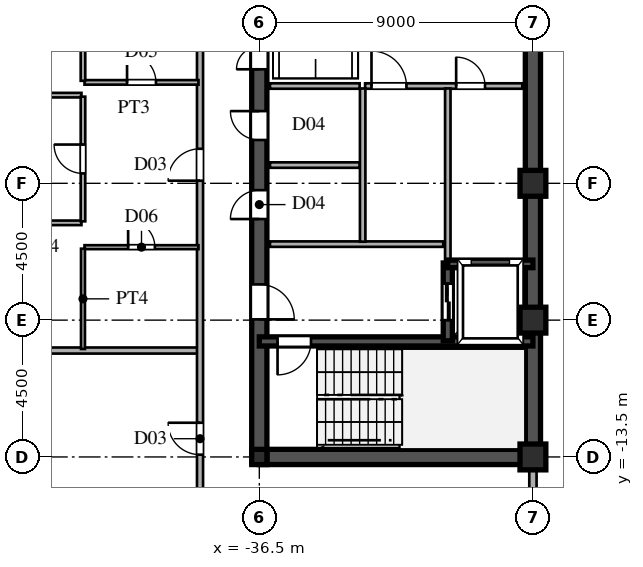
"""IFC4 building model, lengths in metres.
Left out: names, types, materials, properties, quantities, classifications, styles, units other than length and angle.
Written with IfcOpenShell. Run it as: python <this file> out.ifc"""

import sys

from ifc_helpers import new_model, si_unit, direction, frame, frame_2d, origin, origin_2d, place, context, subcontext, project, spatial, rectangle, hollow_rectangle, i_section, extrude, source, transform, mapped, element, fill, save


model = new_model("IFC4")
c1 = context("Model", 3, precision=1e-05, world=origin(), true_north=direction((0.0, 1.0)))
c2 = subcontext(c1, "Body", "Model", "MODEL_VIEW")
j1 = project(units=[si_unit("LENGTHUNIT", "METRE"), si_unit("PLANEANGLEUNIT", "RADIAN")], contexts=[c1])
p1 = place(None, origin())
s1 = spatial("IfcSite", under=j1, at=p1, CompositionType="ELEMENT")
p2 = place(p1, origin())
s2 = spatial("IfcBuilding", under=s1, at=p2, CompositionType="ELEMENT")
p3 = place(p2, frame((0.0, 0.0, 210.3)))
s3 = spatial("IfcBuildingStorey", under=s2, at=p3, CompositionType="ELEMENT", Elevation=210.3)
m1 = source(origin(), c2, "Body", "SweptSolid", [
    extrude(hollow_rectangle(XDim=0.85, YDim=0.85, WallThickness=0.036, at=origin_2d()), origin(), (0.0, 0.0, 1.0), 3.6),
])
for number, where, z_axis, x_axis in (
    (1, (-27.5, -13.5, 0.0), (0.0, 0.0, 1.0), (1.0, 0.0, 0.0)),
    (2, (-27.5, -9.0, 0.0), (0.0, 0.0, 1.0), (1.0, 0.0, 0.0)),
    (3, (-27.5, -4.5, 0.0), (0.0, 0.0, 1.0), (1.0, 0.0, 0.0)),
):
    element("IfcColumn", number, at=place(p3, frame(where, z_axis=z_axis, x_axis=x_axis)), inside=s3, PredefinedType="COLUMN", context=c2, shape_type="MappedRepresentation", body=[
        mapped(m1, transform((0.0, 0.0, 0.0), scale=1.0)),
    ])
m2 = source(origin(), c2, "Body", "SweptSolid", [
    extrude(i_section(OverallWidth=0.5, OverallDepth=0.5, WebThickness=0.02, FlangeThickness=0.032, at=origin_2d()), origin(), (0.0, 0.0, 1.0), 3.6),
])
p4 = place(p3, frame((-36.5, -13.5, 0.0), z_axis=(0.0, 0.0, 1.0), x_axis=(1.0, 0.0, 0.0)))
e4 = element("IfcColumn", 4, at=p4, inside=s3, PredefinedType="COLUMN", context=c2, shape_type="MappedRepresentation", body=[
    mapped(m2, transform((0.0, 0.0, 0.0), scale=1.0)),
])
p5 = place(p3, frame((-27.5, -15.98, 0.0), z_axis=(0.0, 0.0, 1.0), x_axis=(0.0, 1.0, 0.0)))
e5 = element("IfcWall", 5, at=p5, inside=s3, PredefinedType="SOLIDWALL", context=c2, shape_type="SweptSolid", body=[
    extrude(rectangle(XDim=1.605, YDim=0.24, at=frame_2d((0.803, 0.0))), origin(), (0.0, 0.0, 1.0), 3.38),
])
p6 = place(p3, frame((-27.5, -14.375, 0.0), z_axis=(0.0, 0.0, 1.0), x_axis=(0.0, 1.0, 0.0)))
e6 = element("IfcWall", 6, at=p6, inside=s3, PredefinedType="SOLIDWALL", context=c2, shape_type="SweptSolid", body=[
    extrude(rectangle(XDim=0.62, YDim=0.24, at=frame_2d((0.31, 0.0))), origin(), (0.0, 0.0, 1.0), 2.88),
])
p7 = place(p3, frame((-27.5, -13.5, 0.0), z_axis=(0.0, 0.0, 1.0), x_axis=(0.0, 1.0, 0.0)))
e7 = element("IfcWall", 7, at=p7, inside=s3, PredefinedType="SHEAR", context=c2, shape_type="SweptSolid", body=[
    extrude(rectangle(XDim=12.2, YDim=0.5, at=frame_2d((6.1, 0.0))), origin(), (0.0, 0.0, 1.0), 3.38),
])
p8 = place(p3, frame((-27.5, -1.3, 0.0), z_axis=(0.0, 0.0, 1.0), x_axis=(0.0, 1.0, 0.0)))
e8 = element("IfcWall", 8, at=p8, inside=s3, PredefinedType="SHEAR", context=c2, shape_type="SweptSolid", body=[
    extrude(rectangle(XDim=2.6, YDim=0.5, at=frame_2d((1.3, 0.0))), origin(), (0.0, 0.0, 1.0), 3.38),
])
p9 = place(p3, frame((-36.5, -13.5, 0.0), z_axis=(0.0, 0.0, 1.0), x_axis=(1.0, 0.0, 0.0)))
e9 = element("IfcWall", 9, at=p9, inside=s3, PredefinedType="SHEAR", context=c2, shape_type="SweptSolid", body=[
    extrude(rectangle(XDim=9.0, YDim=0.5, at=frame_2d((4.5, 0.0))), origin(), (0.0, 0.0, 1.0), 3.38),
])
p10 = place(p3, frame((-36.5, -13.65, 0.0), z_axis=(0.0, 0.0, 1.0), x_axis=(0.0, 1.0, 0.0)))
e10 = element("IfcWall", 10, at=p10, inside=s3, PredefinedType="SHEAR", context=c2, shape_type="SweptSolid", body=[
    extrude(rectangle(XDim=7.15, YDim=0.5, at=frame_2d((3.575, 0.0))), origin(), (0.0, 0.0, 1.0), 3.38),
])
p11 = place(p10, frame((4.675, 0.0, 0.0)))
e11 = element("IfcOpeningElement", 11, at=p11, cuts=e10, PredefinedType="OPENING", context=c2, shape_type="SweptSolid", body=[
    extrude(rectangle(XDim=1.15, YDim=2.2, at=frame_2d((0.575, 1.1))), frame((0.0, 0.26, 0.0), z_axis=(0.0, -1.0, 0.0), x_axis=(1.0, 0.0, 0.0)), (0.0, 0.0, 1.0), 0.52),
])
p12 = place(p3, frame((-36.5, -1.3, 0.0), z_axis=(0.0, 0.0, 1.0), x_axis=(0.0, 1.0, 0.0)))
e12 = element("IfcWall", 12, at=p12, inside=s3, PredefinedType="SHEAR", context=c2, shape_type="SweptSolid", body=[
    extrude(rectangle(XDim=2.6, YDim=0.5, at=frame_2d((1.3, 0.0))), origin(), (0.0, 0.0, 1.0), 3.38),
])
p13 = place(p12, frame((0.55, 0.0, 0.0)))
e13 = element("IfcOpeningElement", 13, at=p13, cuts=e12, PredefinedType="OPENING", context=c2, shape_type="SweptSolid", body=[
    extrude(rectangle(XDim=1.5, YDim=2.3, at=frame_2d((0.75, 1.15))), frame((0.0, 0.26, 0.0), z_axis=(0.0, -1.0, 0.0), x_axis=(1.0, 0.0, 0.0)), (0.0, 0.0, 1.0), 0.52),
])
p14 = place(p3, frame((-36.5, -6.5, 0.0), z_axis=(0.0, 0.0, 1.0), x_axis=(0.0, 1.0, 0.0)))
e14 = element("IfcWall", 14, at=p14, inside=s3, PredefinedType="SHEAR", context=c2, shape_type="SweptSolid", body=[
    extrude(rectangle(XDim=2.6, YDim=0.5, at=frame_2d((1.3, 0.0))), origin(), (0.0, 0.0, 1.0), 3.38),
])
p15 = place(p14, frame((0.825, 0.0, 0.0)))
e15 = element("IfcOpeningElement", 15, at=p15, cuts=e14, PredefinedType="OPENING", context=c2, shape_type="SweptSolid", body=[
    extrude(rectangle(XDim=0.95, YDim=2.15, at=frame_2d((0.475, 1.075))), frame((0.0, 0.26, 0.0), z_axis=(0.0, -1.0, 0.0), x_axis=(1.0, 0.0, 0.0)), (0.0, 0.0, 1.0), 0.52),
])
p16 = place(p3, frame((-36.5, -3.9, 0.0), z_axis=(0.0, 0.0, 1.0), x_axis=(0.0, 1.0, 0.0)))
e16 = element("IfcWall", 16, at=p16, inside=s3, PredefinedType="SHEAR", context=c2, shape_type="SweptSolid", body=[
    extrude(rectangle(XDim=2.6, YDim=0.5, at=frame_2d((1.3, 0.0))), origin(), (0.0, 0.0, 1.0), 3.38),
])
p17 = place(p16, frame((0.825, 0.0, 0.0)))
e17 = element("IfcOpeningElement", 17, at=p17, cuts=e16, PredefinedType="OPENING", context=c2, shape_type="SweptSolid", body=[
    extrude(rectangle(XDim=0.95, YDim=2.15, at=frame_2d((0.475, 1.075))), frame((0.0, 0.26, 0.0), z_axis=(0.0, -1.0, 0.0), x_axis=(1.0, 0.0, 0.0)), (0.0, 0.0, 1.0), 0.52),
])
p18 = place(p3, frame((-36.5, -9.7, 0.0), z_axis=(0.0, 0.0, 1.0), x_axis=(1.0, 0.0, 0.0)))
e18 = element("IfcWall", 18, at=p18, inside=s3, PredefinedType="SHEAR", context=c2, shape_type="SweptSolid", body=[
    extrude(rectangle(XDim=9.0, YDim=0.3, at=frame_2d((4.5, 0.0))), origin(), (0.0, 0.0, 1.0), 3.38),
])
p19 = place(p18, frame((0.6, 0.0, 0.0)))
e19 = element("IfcOpeningElement", 19, at=p19, cuts=e18, PredefinedType="OPENING", context=c2, shape_type="SweptSolid", body=[
    extrude(rectangle(XDim=1.1, YDim=2.2, at=frame_2d((0.55, 1.1))), frame((0.0, 0.16, 0.0), z_axis=(0.0, -1.0, 0.0), x_axis=(1.0, 0.0, 0.0)), (0.0, 0.0, 1.0), 0.32),
])
p20 = place(p3, frame((-30.3, -7.15, 0.0), z_axis=(0.0, 0.0, 1.0), x_axis=(1.0, 0.0, 0.0)))
e20 = element("IfcWall", 20, at=p20, inside=s3, PredefinedType="SHEAR", context=c2, shape_type="SweptSolid", body=[
    extrude(rectangle(XDim=2.8, YDim=0.25, at=frame_2d((1.4, 0.0))), origin(), (0.0, 0.0, 1.0), 3.38),
])
p21 = place(p3, frame((-30.3, -9.68, 0.0), z_axis=(0.0, 0.0, 1.0), x_axis=(0.0, 1.0, 0.0)))
e21 = element("IfcWall", 21, at=p21, inside=s3, PredefinedType="SHEAR", context=c2, shape_type="SweptSolid", body=[
    extrude(rectangle(XDim=2.56, YDim=0.3, at=frame_2d((1.28, 0.0))), origin(), (0.0, 0.0, 1.0), 3.38),
])
p22 = place(p21, frame((0.68, 0.0, 0.0)))
e22 = element("IfcOpeningElement", 22, at=p22, cuts=e21, PredefinedType="OPENING", context=c2, shape_type="SweptSolid", body=[
    extrude(rectangle(XDim=1.2, YDim=2.25, at=frame_2d((0.6, 1.125))), frame((0.0, 0.16, 0.0), z_axis=(0.0, -1.0, 0.0), x_axis=(1.0, 0.0, 0.0)), (0.0, 0.0, 1.0), 0.32),
])
p23 = place(p3, frame((-36.15, -6.5, 0.0), z_axis=(0.0, 0.0, 1.0), x_axis=(1.0, 0.0, 0.0)))
e23 = element("IfcWall", 23, at=p23, inside=s3, PredefinedType="PARTITIONING", context=c2, shape_type="SweptSolid", body=[
    extrude(rectangle(XDim=5.7, YDim=0.18, at=frame_2d((2.85, 0.0))), origin(), (0.0, 0.0, 1.0), 3.38),
])
p24 = place(p3, frame((-33.1, -6.42, 0.0), z_axis=(0.0, 0.0, 1.0), x_axis=(0.0, 1.0, 0.0)))
e24 = element("IfcWall", 24, at=p24, inside=s3, PredefinedType="PARTITIONING", context=c2, shape_type="SweptSolid", body=[
    extrude(rectangle(XDim=5.04, YDim=0.18, at=frame_2d((2.52, 0.0))), origin(), (0.0, 0.0, 1.0), 3.38),
])
p25 = place(p3, frame((-30.3, -1.3, 0.0), z_axis=(0.0, 0.0, 1.0), x_axis=(1.0, 0.0, 0.0)))
e25 = element("IfcWall", 25, at=p25, inside=s3, PredefinedType="PARTITIONING", context=c2, shape_type="SweptSolid", body=[
    extrude(rectangle(XDim=2.45, YDim=0.18, at=frame_2d((1.225, 0.0))), origin(), (0.0, 0.0, 1.0), 3.38),
])
p26 = place(p25, frame((0.275, 0.0, 0.0)))
e26 = element("IfcOpeningElement", 26, at=p26, cuts=e25, PredefinedType="OPENING", context=c2, shape_type="SweptSolid", body=[
    extrude(rectangle(XDim=0.95, YDim=2.15, at=frame_2d((0.475, 1.075))), frame((0.0, 0.1, 0.0), z_axis=(0.0, -1.0, 0.0), x_axis=(1.0, 0.0, 0.0)), (0.0, 0.0, 1.0), 0.2),
])
p27 = place(p3, frame((-33.02, -1.3, 0.0), z_axis=(0.0, 0.0, 1.0), x_axis=(1.0, 0.0, 0.0)))
e27 = element("IfcWall", 27, at=p27, inside=s3, PredefinedType="PARTITIONING", context=c2, shape_type="SweptSolid", body=[
    extrude(rectangle(XDim=2.72, YDim=0.18, at=frame_2d((1.36, 0.0))), origin(), (0.0, 0.0, 1.0), 3.38),
])
p28 = place(p27, frame((0.21, 0.0, 0.0)))
e28 = element("IfcOpeningElement", 28, at=p28, cuts=e27, PredefinedType="OPENING", context=c2, shape_type="SweptSolid", body=[
    extrude(rectangle(XDim=1.15, YDim=2.2, at=frame_2d((0.575, 1.1))), frame((0.0, 0.1, 0.0), z_axis=(0.0, -1.0, 0.0), x_axis=(1.0, 0.0, 0.0)), (0.0, 0.0, 1.0), 0.2),
])
p29 = place(p3, frame((-30.3, -7.12, 0.0), z_axis=(0.0, 0.0, 1.0), x_axis=(0.0, 1.0, 0.0)))
e29 = element("IfcWall", 29, at=p29, inside=s3, PredefinedType="PARTITIONING", context=c2, shape_type="SweptSolid", body=[
    extrude(rectangle(XDim=5.74, YDim=0.18, at=frame_2d((2.87, 0.0))), origin(), (0.0, 0.0, 1.0), 3.38),
])
for number, where, z_axis, x_axis in (
    (30, (-36.15, -1.3, 0.0), (0.0, 0.0, 1.0), (1.0, 0.0, 0.0)),
    (31, (-36.15, -3.9, 0.0), (0.0, 0.0, 1.0), (1.0, 0.0, 0.0)),
):
    element("IfcWall", number, at=place(p3, frame(where, z_axis=z_axis, x_axis=x_axis)), inside=s3, PredefinedType="PARTITIONING", context=c2, shape_type="SweptSolid", body=[
        extrude(rectangle(XDim=2.95, YDim=0.18, at=frame_2d((1.475, 0.0))), origin(), (0.0, 0.0, 1.0), 3.38),
    ])
p30 = place(p3, frame((-53.343, -10.0, 0.0), z_axis=(0.0, 0.0, 1.0), x_axis=(1.0, 0.0, 0.0)))
e32 = element("IfcWall", 32, at=p30, inside=s3, PredefinedType="PARTITIONING", context=c2, shape_type="SweptSolid", body=[
    extrude(rectangle(XDim=14.813, YDim=0.2, at=frame_2d((7.406, 0.0))), origin(), (0.0, 0.0, 1.0), 3.38),
])
p31 = place(p3, frame((-42.25, -6.6, 0.0), z_axis=(0.0, 0.0, 1.0), x_axis=(1.0, 0.0, 0.0)))
e33 = element("IfcWall", 33, at=p31, inside=s3, PredefinedType="PARTITIONING", context=c2, shape_type="SweptSolid", body=[
    extrude(rectangle(XDim=3.75, YDim=0.13, at=frame_2d((1.875, 0.0))), origin(), (0.0, 0.0, 1.0), 3.38),
])
p32 = place(p31, frame((1.435, 0.0, 0.0)))
e34 = element("IfcOpeningElement", 34, at=p32, cuts=e33, PredefinedType="OPENING", context=c2, shape_type="SweptSolid", body=[
    extrude(rectangle(XDim=0.88, YDim=2.1, at=frame_2d((0.44, 1.05))), frame((0.0, 0.075, 0.0), z_axis=(0.0, -1.0, 0.0), x_axis=(1.0, 0.0, 0.0)), (0.0, 0.0, 1.0), 0.15),
])
p33 = place(p3, frame((-60.368, -5.8, 0.0), z_axis=(0.0, 0.0, 1.0), x_axis=(1.0, 0.0, 0.0)))
e35 = element("IfcWall", 35, at=p33, inside=s3, PredefinedType="PARTITIONING", context=c2, shape_type="SweptSolid", body=[
    extrude(rectangle(XDim=18.018, YDim=0.15, at=frame_2d((9.009, 0.0))), origin(), (0.0, 0.0, 1.0), 3.38),
])
p34 = place(p33, frame((11.493, 0.0, 0.0)))
e36 = element("IfcOpeningElement", 36, at=p34, cuts=e35, PredefinedType="OPENING", context=c2, shape_type="SweptSolid", body=[
    extrude(rectangle(XDim=0.95, YDim=2.15, at=frame_2d((0.475, 1.075))), frame((0.0, 0.085, 0.0), z_axis=(0.0, -1.0, 0.0), x_axis=(1.0, 0.0, 0.0)), (0.0, 0.0, 1.0), 0.17),
])
p35 = place(p33, frame((2.476, 0.0, 0.0)))
e37 = element("IfcOpeningElement", 37, at=p35, cuts=e35, PredefinedType="OPENING", context=c2, shape_type="SweptSolid", body=[
    extrude(rectangle(XDim=0.95, YDim=2.15, at=frame_2d((0.475, 1.075))), frame((0.0, 0.085, 0.0), z_axis=(0.0, -1.0, 0.0), x_axis=(1.0, 0.0, 0.0)), (0.0, 0.0, 1.0), 0.17),
])
p36 = place(p3, frame((-67.09, -1.6, 0.0), z_axis=(0.0, 0.0, 1.0), x_axis=(1.0, 0.0, 0.0)))
e38 = element("IfcWall", 38, at=p36, inside=s3, PredefinedType="PARTITIONING", context=c2, shape_type="SweptSolid", body=[
    extrude(rectangle(XDim=24.74, YDim=0.15, at=frame_2d((12.37, 0.0))), origin(), (0.0, 0.0, 1.0), 3.38),
])
p37 = place(p36, frame((18.215, 0.0, 0.0)))
e39 = element("IfcOpeningElement", 39, at=p37, cuts=e38, PredefinedType="OPENING", context=c2, shape_type="SweptSolid", body=[
    extrude(rectangle(XDim=0.95, YDim=2.15, at=frame_2d((0.475, 1.075))), frame((0.0, 0.085, 0.0), z_axis=(0.0, -1.0, 0.0), x_axis=(1.0, 0.0, 0.0)), (0.0, 0.0, 1.0), 0.17),
])
p38 = place(p36, frame((5.698, 0.0, 0.0)))
e40 = element("IfcOpeningElement", 40, at=p38, cuts=e38, PredefinedType="OPENING", context=c2, shape_type="SweptSolid", body=[
    extrude(rectangle(XDim=0.95, YDim=2.15, at=frame_2d((0.475, 1.075))), frame((0.0, 0.085, 0.0), z_axis=(0.0, -1.0, 0.0), x_axis=(1.0, 0.0, 0.0)), (0.0, 0.0, 1.0), 0.17),
])
p39 = place(p3, frame((-42.25, -1.18, 0.0), z_axis=(0.0, 0.0, 1.0), x_axis=(1.0, 0.0, 0.0)))
e41 = element("IfcWall", 41, at=p39, inside=s3, PredefinedType="PARTITIONING", context=c2, shape_type="SweptSolid", body=[
    extrude(rectangle(XDim=3.75, YDim=0.15, at=frame_2d((1.875, 0.0))), origin(), (0.0, 0.0, 1.0), 3.38),
])
p40 = place(p39, frame((1.4, 0.0, 0.0)))
e42 = element("IfcOpeningElement", 42, at=p40, cuts=e41, PredefinedType="OPENING", context=c2, shape_type="SweptSolid", body=[
    extrude(rectangle(XDim=0.95, YDim=2.15, at=frame_2d((0.475, 1.075))), frame((0.0, 0.085, 0.0), z_axis=(0.0, -1.0, 0.0), x_axis=(1.0, 0.0, 0.0)), (0.0, 0.0, 1.0), 0.17),
])
p41 = place(p3, frame((-42.3, -9.95, 0.0), z_axis=(0.0, 0.0, 1.0), x_axis=(0.0, 1.0, 0.0)))
e43 = element("IfcWall", 43, at=p41, inside=s3, PredefinedType="PARTITIONING", context=c2, shape_type="SweptSolid", body=[
    extrude(rectangle(XDim=3.3, YDim=0.13, at=frame_2d((1.65, 0.0))), origin(), (0.0, 0.0, 1.0), 3.38),
])
p42 = place(p3, frame((-42.3, -5.75, 0.0), z_axis=(0.0, 0.0, 1.0), x_axis=(0.0, 1.0, 0.0)))
e44 = element("IfcWall", 44, at=p42, inside=s3, PredefinedType="PARTITIONING", context=c2, shape_type="SweptSolid", body=[
    extrude(rectangle(XDim=4.1, YDim=0.15, at=frame_2d((2.05, 0.0))), origin(), (0.0, 0.0, 1.0), 3.38),
])
p43 = place(p42, frame((1.575, 0.0, 0.0)))
e45 = element("IfcOpeningElement", 45, at=p43, cuts=e44, PredefinedType="OPENING", context=c2, shape_type="SweptSolid", body=[
    extrude(rectangle(XDim=0.95, YDim=2.15, at=frame_2d((0.475, 1.075))), frame((0.0, 0.085, 0.0), z_axis=(0.0, -1.0, 0.0), x_axis=(1.0, 0.0, 0.0)), (0.0, 0.0, 1.0), 0.17),
])
p44 = place(p3, frame((-42.3, -1.128, 0.0), z_axis=(0.0, 0.0, 1.0), x_axis=(0.0, 1.0, 0.0)))
e46 = element("IfcWall", 46, at=p44, inside=s3, PredefinedType="PARTITIONING", context=c2, shape_type="SweptSolid", body=[
    extrude(rectangle(XDim=3.678, YDim=0.15, at=frame_2d((1.839, 0.0))), origin(), (0.0, 0.0, 1.0), 3.38),
])
p45 = place(p3, frame((-38.45, -15.715, 0.0), z_axis=(0.0, 0.0, 1.0), x_axis=(0.0, 1.0, 0.0)))
e47 = element("IfcWall", 47, at=p45, inside=s3, PredefinedType="PARTITIONING", context=c2, shape_type="SweptSolid", body=[
    extrude(rectangle(XDim=31.43, YDim=0.2, at=frame_2d((15.715, 0.0))), origin(), (0.0, 0.0, 1.0), 3.38),
])
p46 = place(p45, frame((2.29, 0.0, 0.0)))
e48 = element("IfcOpeningElement", 48, at=p46, cuts=e47, PredefinedType="OPENING", context=c2, shape_type="SweptSolid", body=[
    extrude(rectangle(XDim=1.05, YDim=2.25, at=frame_2d((0.525, 1.125))), frame((0.0, 0.11, 0.0), z_axis=(0.0, -1.0, 0.0), x_axis=(1.0, 0.0, 0.0)), (0.0, 0.0, 1.0), 0.22),
])
p47 = place(p45, frame((11.301, 0.0, 0.0)))
e49 = element("IfcOpeningElement", 49, at=p47, cuts=e47, PredefinedType="OPENING", context=c2, shape_type="SweptSolid", body=[
    extrude(rectangle(XDim=1.05, YDim=2.25, at=frame_2d((0.525, 1.125))), frame((0.0, 0.11, 0.0), z_axis=(0.0, -1.0, 0.0), x_axis=(1.0, 0.0, 0.0)), (0.0, 0.0, 1.0), 0.22),
])
p48 = place(p45, frame((24.39, 0.0, 0.0)))
e50 = element("IfcOpeningElement", 50, at=p48, cuts=e47, PredefinedType="OPENING", context=c2, shape_type="SweptSolid", body=[
    extrude(rectangle(XDim=1.05, YDim=2.25, at=frame_2d((0.525, 1.125))), frame((0.0, 0.11, 0.0), z_axis=(0.0, -1.0, 0.0), x_axis=(1.0, 0.0, 0.0)), (0.0, 0.0, 1.0), 0.22),
])
m3 = source(origin(), c2, "Body", "SweptSolid", [
    extrude(rectangle(XDim=1.15, YDim=2.2, at=frame_2d((0.575, 1.1))), frame((0.0, 0.025, 0.0), z_axis=(0.0, -1.0, 0.0), x_axis=(1.0, 0.0, 0.0)), (0.0, 0.0, 1.0), 0.05),
])
p49 = place(p11, frame((1.15, 0.0, 0.0), z_axis=(0.0, 0.0, 1.0), x_axis=(-1.0, 0.0, 0.0)))
e51 = element("IfcDoor", 51, at=p49, inside=s3, OperationType="SINGLE_SWING_LEFT", PredefinedType="DOOR", context=c2, shape_type="MappedRepresentation", body=[
    mapped(m3, transform((0.0, 0.0, 0.0), scale=1.0)),
])
fill(e11, e51)
m4 = source(origin(), c2, "Body", "SweptSolid", [
    extrude(rectangle(XDim=1.5, YDim=2.3, at=frame_2d((0.75, 1.15))), frame((0.0, 0.025, 0.0), z_axis=(0.0, -1.0, 0.0), x_axis=(1.0, 0.0, 0.0)), (0.0, 0.0, 1.0), 0.05),
])
p50 = place(p13, origin())
e52 = element("IfcDoor", 52, at=p50, inside=s3, OperationType="DOUBLE_SWING_LEFT", PredefinedType="DOOR", context=c2, shape_type="MappedRepresentation", body=[
    mapped(m4, transform((0.0, 0.0, 0.0), scale=1.0)),
])
fill(e13, e52)
m5 = source(origin(), c2, "Body", "SweptSolid", [
    extrude(rectangle(XDim=0.95, YDim=2.15, at=frame_2d((0.475, 1.075))), frame((0.0, 0.025, 0.0), z_axis=(0.0, -1.0, 0.0), x_axis=(1.0, 0.0, 0.0)), (0.0, 0.0, 1.0), 0.05),
])
p51 = place(p15, origin())
e53 = element("IfcDoor", 53, at=p51, inside=s3, OperationType="SINGLE_SWING_LEFT", PredefinedType="DOOR", context=c2, shape_type="MappedRepresentation", body=[
    mapped(m5, transform((0.0, 0.0, 0.0), scale=1.0)),
])
fill(e15, e53)
p52 = place(p17, origin())
e54 = element("IfcDoor", 54, at=p52, inside=s3, OperationType="SINGLE_SWING_RIGHT", PredefinedType="DOOR", context=c2, shape_type="MappedRepresentation", body=[
    mapped(m5, transform((0.0, 0.0, 0.0), scale=1.0)),
])
fill(e17, e54)
m6 = source(origin(), c2, "Body", "SweptSolid", [
    extrude(rectangle(XDim=1.1, YDim=2.2, at=frame_2d((0.55, 1.1))), frame((0.0, 0.025, 0.0), z_axis=(0.0, -1.0, 0.0), x_axis=(1.0, 0.0, 0.0)), (0.0, 0.0, 1.0), 0.05),
])
p53 = place(p19, frame((1.1, 0.0, 0.0), z_axis=(0.0, 0.0, 1.0), x_axis=(-1.0, 0.0, 0.0)))
e55 = element("IfcDoor", 55, at=p53, inside=s3, OperationType="SINGLE_SWING_LEFT", PredefinedType="DOOR", context=c2, shape_type="MappedRepresentation", body=[
    mapped(m6, transform((0.0, 0.0, 0.0), scale=1.0)),
])
fill(e19, e55)
m7 = source(origin(), c2, "Body", "SweptSolid", [
    extrude(rectangle(XDim=1.2, YDim=2.25, at=frame_2d((0.6, 1.125))), frame((0.0, 0.025, 0.0), z_axis=(0.0, -1.0, 0.0), x_axis=(1.0, 0.0, 0.0)), (0.0, 0.0, 1.0), 0.05),
])
p54 = place(p22, origin())
e56 = element("IfcDoor", 56, at=p54, inside=s3, OperationType="DOUBLE_DOOR_SLIDING", PredefinedType="DOOR", context=c2, shape_type="MappedRepresentation", body=[
    mapped(m7, transform((0.0, 0.0, 0.0), scale=1.0)),
])
fill(e22, e56)
p55 = place(p26, origin())
e57 = element("IfcDoor", 57, at=p55, inside=s3, OperationType="SINGLE_SWING_LEFT", PredefinedType="DOOR", context=c2, shape_type="MappedRepresentation", body=[
    mapped(m5, transform((0.0, 0.0, 0.0), scale=1.0)),
])
fill(e26, e57)
p56 = place(p28, origin())
e58 = element("IfcDoor", 58, at=p56, inside=s3, OperationType="SINGLE_SWING_LEFT", PredefinedType="DOOR", context=c2, shape_type="MappedRepresentation", body=[
    mapped(m3, transform((0.0, 0.0, 0.0), scale=1.0)),
])
fill(e28, e58)
m8 = source(origin(), c2, "Body", "SweptSolid", [
    extrude(rectangle(XDim=0.88, YDim=2.1, at=frame_2d((0.44, 1.05))), frame((0.0, 0.025, 0.0), z_axis=(0.0, -1.0, 0.0), x_axis=(1.0, 0.0, 0.0)), (0.0, 0.0, 1.0), 0.05),
])
p57 = place(p32, origin())
e59 = element("IfcDoor", 59, at=p57, inside=s3, OperationType="SINGLE_SWING_LEFT", PredefinedType="DOOR", context=c2, shape_type="MappedRepresentation", body=[
    mapped(m8, transform((0.0, 0.0, 0.0), scale=1.0)),
])
fill(e34, e59)
m9 = source(origin(), c2, "Body", "SweptSolid", [
    extrude(rectangle(XDim=0.95, YDim=2.15, at=frame_2d((0.475, 1.075))), frame((0.0, 0.025, 0.0), z_axis=(0.0, -1.0, 0.0), x_axis=(1.0, 0.0, 0.0)), (0.0, 0.0, 1.0), 0.05),
])
p58 = place(p40, origin())
e60 = element("IfcDoor", 60, at=p58, inside=s3, OperationType="SINGLE_SWING_LEFT", PredefinedType="DOOR", context=c2, shape_type="MappedRepresentation", body=[
    mapped(m9, transform((0.0, 0.0, 0.0), scale=1.0)),
])
fill(e42, e60)
p59 = place(p43, origin())
e61 = element("IfcDoor", 61, at=p59, inside=s3, OperationType="SINGLE_SWING_RIGHT", PredefinedType="DOOR", context=c2, shape_type="MappedRepresentation", body=[
    mapped(m9, transform((0.0, 0.0, 0.0), scale=1.0)),
])
fill(e45, e61)
m10 = source(origin(), c2, "Body", "SweptSolid", [
    extrude(rectangle(XDim=1.05, YDim=2.25, at=frame_2d((0.525, 1.125))), frame((0.0, 0.025, 0.0), z_axis=(0.0, -1.0, 0.0), x_axis=(1.0, 0.0, 0.0)), (0.0, 0.0, 1.0), 0.05),
])
p60 = place(p46, origin())
e62 = element("IfcDoor", 62, at=p60, inside=s3, OperationType="SINGLE_SWING_RIGHT", PredefinedType="DOOR", context=c2, shape_type="MappedRepresentation", body=[
    mapped(m10, transform((0.0, 0.0, 0.0), scale=1.0)),
])
fill(e48, e62)
p61 = place(p47, origin())
e63 = element("IfcDoor", 63, at=p61, inside=s3, OperationType="SINGLE_SWING_LEFT", PredefinedType="DOOR", context=c2, shape_type="MappedRepresentation", body=[
    mapped(m10, transform((0.0, 0.0, 0.0), scale=1.0)),
])
fill(e49, e63)
save(model, sys.argv[1])
